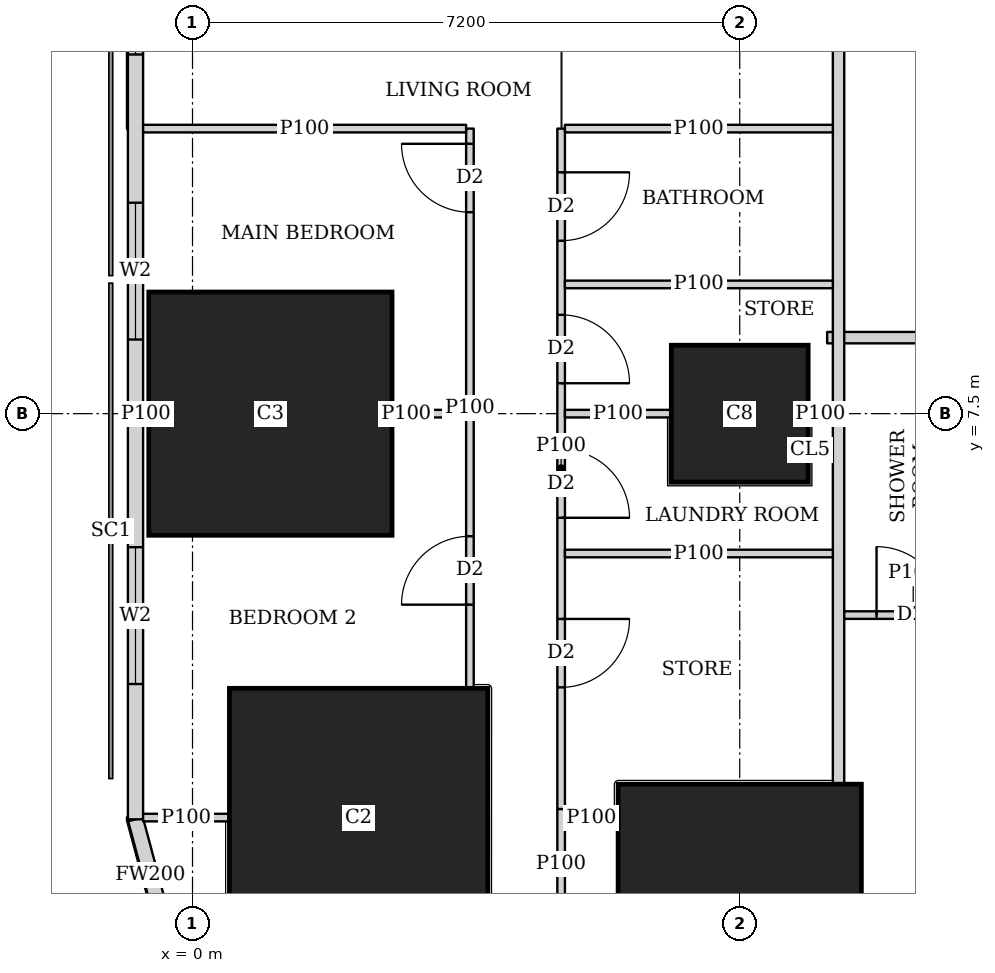
"""IFC4 building model, lengths in metres.
Left out: names, types, materials, properties, quantities, classifications, styles, units other than length and angle.
Written with IfcOpenShell. Run it as: python <this file> out.ifc"""

import sys

from ifc_helpers import new_model, si_unit, direction, frame, frame_2d, origin, origin_2d, place, context, subcontext, project, spatial, rectangle, extrude, element, fill, save


model = new_model("IFC4")
c1 = context("Model", 3, precision=1e-05, world=origin(), true_north=direction((0.0, 1.0)))
c2 = subcontext(c1, "Body", "Model", "MODEL_VIEW")
j1 = project(units=[si_unit("LENGTHUNIT", "METRE"), si_unit("PLANEANGLEUNIT", "RADIAN")], contexts=[c1])
p1 = place(None, origin())
s1 = spatial("IfcSite", under=j1, at=p1, CompositionType="ELEMENT")
p2 = place(p1, origin())
s2 = spatial("IfcBuilding", under=s1, at=p2, CompositionType="ELEMENT")
p3 = place(p2, frame((0.0, 0.0, 23.75)))
s3 = spatial("IfcBuildingStorey", under=s2, at=p3, CompositionType="ELEMENT", Elevation=23.75)
p4 = place(p3, frame((7.2, 1.025, 0.0), z_axis=(0.0, 0.0, 1.0), x_axis=(1.0, 0.0, 0.0)))
e1 = element("IfcColumn", 1, at=p4, inside=s3, PredefinedType="COLUMN", context=c2, shape_type="SweptSolid", body=[
    extrude(rectangle(XDim=3.2, YDim=3.2, at=origin_2d()), origin(), (0.0, 0.0, 1.0), 3.75),
])
p5 = place(p3, frame((2.186, 2.186, 0.0), z_axis=(0.0, 0.0, 1.0), x_axis=(1.0, 0.0, 0.0)))
e2 = element("IfcColumn", 2, at=p5, inside=s3, PredefinedType="COLUMN", context=c2, shape_type="SweptSolid", body=[
    extrude(rectangle(XDim=3.4, YDim=3.4, at=origin_2d()), origin(), (0.0, 0.0, 1.0), 3.75),
])
p6 = place(p3, frame((1.025, 7.5, 0.0), z_axis=(0.0, 0.0, 1.0), x_axis=(1.0, 0.0, 0.0)))
e3 = element("IfcColumn", 3, at=p6, inside=s3, PredefinedType="COLUMN", context=c2, shape_type="SweptSolid", body=[
    extrude(rectangle(XDim=3.2, YDim=3.2, at=origin_2d()), origin(), (0.0, 0.0, 1.0), 3.75),
])
p7 = place(p3, frame((7.2, 7.5, 0.0), z_axis=(0.0, 0.0, 1.0), x_axis=(1.0, 0.0, 0.0)))
e4 = element("IfcColumn", 4, at=p7, inside=s3, PredefinedType="COLUMN", context=c2, shape_type="SweptSolid", body=[
    extrude(rectangle(XDim=1.8, YDim=1.8, at=origin_2d()), origin(), (0.0, 0.0, 1.0), 3.75),
])
p8 = place(p3, frame((-0.75, 42.837, 0.0), z_axis=(0.0, 0.0, 1.0), x_axis=(0.0, -1.0, 0.0)))
e5 = element("IfcWall", 5, at=p8, inside=s3, PredefinedType="SOLIDWALL", context=c2, shape_type="SweptSolid", body=[
    extrude(rectangle(XDim=40.674, YDim=0.2, at=frame_2d((20.337, 0.0))), origin(), (0.0, 0.0, 1.0), 3.5),
])
p9 = place(p8, frame((1.78, 0.0, 0.9)))
e6 = element("IfcOpeningElement", 6, at=p9, cuts=e5, PredefinedType="OPENING", context=c2, shape_type="SweptSolid", body=[
    extrude(rectangle(XDim=1.8, YDim=1.5, at=frame_2d((0.9, 0.75))), frame((0.0, 0.11, 0.0), z_axis=(0.0, -1.0, 0.0), x_axis=(1.0, 0.0, 0.0)), (0.0, 0.0, 1.0), 0.22),
])
p10 = place(p8, frame((6.312, 0.0, 0.9)))
e7 = element("IfcOpeningElement", 7, at=p10, cuts=e5, PredefinedType="OPENING", context=c2, shape_type="SweptSolid", body=[
    extrude(rectangle(XDim=1.8, YDim=1.5, at=frame_2d((0.9, 0.75))), frame((0.0, 0.11, 0.0), z_axis=(0.0, -1.0, 0.0), x_axis=(1.0, 0.0, 0.0)), (0.0, 0.0, 1.0), 0.22),
])
p11 = place(p8, frame((10.062, 0.0, 0.9)))
e8 = element("IfcOpeningElement", 8, at=p11, cuts=e5, PredefinedType="OPENING", context=c2, shape_type="SweptSolid", body=[
    extrude(rectangle(XDim=1.8, YDim=1.5, at=frame_2d((0.9, 0.75))), frame((0.0, 0.11, 0.0), z_axis=(0.0, -1.0, 0.0), x_axis=(1.0, 0.0, 0.0)), (0.0, 0.0, 1.0), 0.22),
])
p12 = place(p8, frame((13.812, 0.0, 0.9)))
e9 = element("IfcOpeningElement", 9, at=p12, cuts=e5, PredefinedType="OPENING", context=c2, shape_type="SweptSolid", body=[
    extrude(rectangle(XDim=1.8, YDim=1.5, at=frame_2d((0.9, 0.75))), frame((0.0, 0.11, 0.0), z_axis=(0.0, -1.0, 0.0), x_axis=(1.0, 0.0, 0.0)), (0.0, 0.0, 1.0), 0.22),
])
p13 = place(p8, frame((17.562, 0.0, 0.9)))
e10 = element("IfcOpeningElement", 10, at=p13, cuts=e5, PredefinedType="OPENING", context=c2, shape_type="SweptSolid", body=[
    extrude(rectangle(XDim=1.8, YDim=1.5, at=frame_2d((0.9, 0.75))), frame((0.0, 0.11, 0.0), z_axis=(0.0, -1.0, 0.0), x_axis=(1.0, 0.0, 0.0)), (0.0, 0.0, 1.0), 0.22),
])
p14 = place(p8, frame((21.312, 0.0, 0.9)))
e11 = element("IfcOpeningElement", 11, at=p14, cuts=e5, PredefinedType="OPENING", context=c2, shape_type="SweptSolid", body=[
    extrude(rectangle(XDim=1.8, YDim=1.5, at=frame_2d((0.9, 0.75))), frame((0.0, 0.11, 0.0), z_axis=(0.0, -1.0, 0.0), x_axis=(1.0, 0.0, 0.0)), (0.0, 0.0, 1.0), 0.22),
])
p15 = place(p8, frame((25.062, 0.0, 0.9)))
e12 = element("IfcOpeningElement", 12, at=p15, cuts=e5, PredefinedType="OPENING", context=c2, shape_type="SweptSolid", body=[
    extrude(rectangle(XDim=1.8, YDim=1.5, at=frame_2d((0.9, 0.75))), frame((0.0, 0.11, 0.0), z_axis=(0.0, -1.0, 0.0), x_axis=(1.0, 0.0, 0.0)), (0.0, 0.0, 1.0), 0.22),
])
p16 = place(p8, frame((28.812, 0.0, 0.9)))
e13 = element("IfcOpeningElement", 13, at=p16, cuts=e5, PredefinedType="OPENING", context=c2, shape_type="SweptSolid", body=[
    extrude(rectangle(XDim=1.8, YDim=1.5, at=frame_2d((0.9, 0.75))), frame((0.0, 0.11, 0.0), z_axis=(0.0, -1.0, 0.0), x_axis=(1.0, 0.0, 0.0)), (0.0, 0.0, 1.0), 0.22),
])
p17 = place(p8, frame((32.562, 0.0, 0.9)))
e14 = element("IfcOpeningElement", 14, at=p17, cuts=e5, PredefinedType="OPENING", context=c2, shape_type="SweptSolid", body=[
    extrude(rectangle(XDim=1.8, YDim=1.5, at=frame_2d((0.9, 0.75))), frame((0.0, 0.11, 0.0), z_axis=(0.0, -1.0, 0.0), x_axis=(1.0, 0.0, 0.0)), (0.0, 0.0, 1.0), 0.22),
])
p18 = place(p8, frame((37.094, 0.0, 0.9)))
e15 = element("IfcOpeningElement", 15, at=p18, cuts=e5, PredefinedType="OPENING", context=c2, shape_type="SweptSolid", body=[
    extrude(rectangle(XDim=1.8, YDim=1.5, at=frame_2d((0.9, 0.75))), frame((0.0, 0.11, 0.0), z_axis=(0.0, -1.0, 0.0), x_axis=(1.0, 0.0, 0.0)), (0.0, 0.0, 1.0), 0.22),
])
p19 = place(p3, frame((-0.75, 2.163, 0.0), z_axis=(0.0, 0.0, 1.0), x_axis=(0.259168954497, -0.965832000415, 0.0)))
e16 = element("IfcWall", 16, at=p19, inside=s3, PredefinedType="SOLIDWALL", context=c2, shape_type="SweptSolid", body=[
    extrude(rectangle(XDim=1.513, YDim=0.2, at=frame_2d((0.756, 0.0))), origin(), (0.0, 0.0, 1.0), 3.5),
])
p20 = place(p3, frame((8.5, 2.626, 0.0), z_axis=(0.0, 0.0, 1.0), x_axis=(0.0, 1.0, 0.0)))
e17 = element("IfcWall", 17, at=p20, inside=s3, PredefinedType="SOLIDWALL", context=c2, shape_type="SweptSolid", body=[
    extrude(rectangle(XDim=39.773, YDim=0.15, at=frame_2d((19.886, 0.0))), origin(), (0.0, 0.0, 1.0), 2.05),
])
p21 = place(p20, frame((9.786, 0.0, 0.0)))
e18 = element("IfcOpeningElement", 18, at=p21, cuts=e17, PredefinedType="OPENING", context=c2, shape_type="SweptSolid", body=[
    extrude(rectangle(XDim=1.0, YDim=2.0, at=frame_2d((0.5, 1.0))), frame((0.0, 0.085, 0.0), z_axis=(0.0, -1.0, 0.0), x_axis=(1.0, 0.0, 0.0)), (0.0, 0.0, 1.0), 0.17),
])
p22 = place(p20, frame((13.961, 0.0, 0.0)))
e19 = element("IfcOpeningElement", 19, at=p22, cuts=e17, PredefinedType="OPENING", context=c2, shape_type="SweptSolid", body=[
    extrude(rectangle(XDim=1.0, YDim=2.0, at=frame_2d((0.5, 1.0))), frame((0.0, 0.085, 0.0), z_axis=(0.0, -1.0, 0.0), x_axis=(1.0, 0.0, 0.0)), (0.0, 0.0, 1.0), 0.17),
])
p23 = place(p20, frame((24.787, 0.0, 0.0)))
e20 = element("IfcOpeningElement", 20, at=p23, cuts=e17, PredefinedType="OPENING", context=c2, shape_type="SweptSolid", body=[
    extrude(rectangle(XDim=1.0, YDim=2.0, at=frame_2d((0.5, 1.0))), frame((0.0, 0.085, 0.0), z_axis=(0.0, -1.0, 0.0), x_axis=(1.0, 0.0, 0.0)), (0.0, 0.0, 1.0), 0.17),
])
p24 = place(p20, frame((32.287, 0.0, 0.0)))
e21 = element("IfcOpeningElement", 21, at=p24, cuts=e17, PredefinedType="OPENING", context=c2, shape_type="SweptSolid", body=[
    extrude(rectangle(XDim=1.0, YDim=2.0, at=frame_2d((0.5, 1.0))), frame((0.0, 0.085, 0.0), z_axis=(0.0, -1.0, 0.0), x_axis=(1.0, 0.0, 0.0)), (0.0, 0.0, 1.0), 0.17),
])
p25 = place(p3, frame((40.054, 8.5, 0.0), z_axis=(0.0, 0.0, 1.0), x_axis=(-1.0, 0.0, 0.0)))
e22 = element("IfcWall", 22, at=p25, inside=s3, PredefinedType="SOLIDWALL", context=c2, shape_type="SweptSolid", body=[
    extrude(rectangle(XDim=31.704, YDim=0.15, at=frame_2d((15.852, 0.0))), origin(), (0.0, 0.0, 1.0), 3.5),
])
p26 = place(p25, frame((27.321, 0.0, 0.0)))
e23 = element("IfcOpeningElement", 23, at=p26, cuts=e22, PredefinedType="OPENING", context=c2, shape_type="SweptSolid", body=[
    extrude(rectangle(XDim=1.0, YDim=2.1, at=frame_2d((0.5, 1.05))), frame((0.0, 0.085, 0.0), z_axis=(0.0, -1.0, 0.0), x_axis=(1.0, 0.0, 0.0)), (0.0, 0.0, 1.0), 0.17),
])
p27 = place(p25, frame((23.054, 0.0, 0.0)))
e24 = element("IfcOpeningElement", 24, at=p27, cuts=e22, PredefinedType="OPENING", context=c2, shape_type="SweptSolid", body=[
    extrude(rectangle(XDim=1.0, YDim=2.1, at=frame_2d((0.5, 1.05))), frame((0.0, 0.085, 0.0), z_axis=(0.0, -1.0, 0.0), x_axis=(1.0, 0.0, 0.0)), (0.0, 0.0, 1.0), 0.17),
])
p28 = place(p25, frame((15.754, 0.0, 0.0)))
e25 = element("IfcOpeningElement", 25, at=p28, cuts=e22, PredefinedType="OPENING", context=c2, shape_type="SweptSolid", body=[
    extrude(rectangle(XDim=1.0, YDim=2.1, at=frame_2d((0.5, 1.05))), frame((0.0, 0.085, 0.0), z_axis=(0.0, -1.0, 0.0), x_axis=(1.0, 0.0, 0.0)), (0.0, 0.0, 1.0), 0.17),
])
p29 = place(p25, frame((5.754, 0.0, 0.0)))
e26 = element("IfcOpeningElement", 26, at=p29, cuts=e22, PredefinedType="OPENING", context=c2, shape_type="SweptSolid", body=[
    extrude(rectangle(XDim=1.0, YDim=2.1, at=frame_2d((0.5, 1.05))), frame((0.0, 0.085, 0.0), z_axis=(0.0, -1.0, 0.0), x_axis=(1.0, 0.0, 0.0)), (0.0, 0.0, 1.0), 0.17),
])
p30 = place(p3, frame((3.65, 3.887, 0.0), z_axis=(0.0, 0.0, 1.0), x_axis=(0.0, 1.0, 0.0)))
e27 = element("IfcWall", 27, at=p30, inside=s3, PredefinedType="PARTITIONING", context=c2, shape_type="SweptSolid", body=[
    extrude(rectangle(XDim=7.363, YDim=0.1, at=frame_2d((3.682, 0.0))), origin(), (0.0, 0.0, 1.0), 3.5),
])
p31 = place(p30, frame((6.263, 0.0, 0.0)))
e28 = element("IfcOpeningElement", 28, at=p31, cuts=e27, PredefinedType="OPENING", context=c2, shape_type="SweptSolid", body=[
    extrude(rectangle(XDim=0.9, YDim=2.1, at=frame_2d((0.45, 1.05))), frame((0.0, 0.06, 0.0), z_axis=(0.0, -1.0, 0.0), x_axis=(1.0, 0.0, 0.0)), (0.0, 0.0, 1.0), 0.12),
])
p32 = place(p30, frame((1.1, 0.0, 0.0)))
e29 = element("IfcOpeningElement", 29, at=p32, cuts=e27, PredefinedType="OPENING", context=c2, shape_type="SweptSolid", body=[
    extrude(rectangle(XDim=0.9, YDim=2.1, at=frame_2d((0.45, 1.05))), frame((0.0, 0.06, 0.0), z_axis=(0.0, -1.0, 0.0), x_axis=(1.0, 0.0, 0.0)), (0.0, 0.0, 1.0), 0.12),
])
p33 = place(p3, frame((4.85, 0.839, 0.0), z_axis=(0.0, 0.0, 1.0), x_axis=(0.0, 1.0, 0.0)))
e30 = element("IfcWall", 30, at=p33, inside=s3, PredefinedType="PARTITIONING", context=c2, shape_type="SweptSolid", body=[
    extrude(rectangle(XDim=1.46, YDim=0.1, at=frame_2d((0.73, 0.0))), origin(), (0.0, 0.0, 1.0), 2.1),
])
p34 = place(p3, frame((4.85, 2.299, 0.0), z_axis=(0.0, 0.0, 1.0), x_axis=(0.0, 1.0, 0.0)))
e31 = element("IfcWall", 31, at=p34, inside=s3, PredefinedType="PARTITIONING", context=c2, shape_type="SweptSolid", body=[
    extrude(rectangle(XDim=8.951, YDim=0.1, at=frame_2d((4.476, 0.0))), origin(), (0.0, 0.0, 1.0), 3.5),
])
p35 = place(p34, frame((7.476, 0.0, 0.0)))
e32 = element("IfcOpeningElement", 32, at=p35, cuts=e31, PredefinedType="OPENING", context=c2, shape_type="SweptSolid", body=[
    extrude(rectangle(XDim=0.9, YDim=2.1, at=frame_2d((0.45, 1.05))), frame((0.0, 0.06, 0.0), z_axis=(0.0, -1.0, 0.0), x_axis=(1.0, 0.0, 0.0)), (0.0, 0.0, 1.0), 0.12),
])
p36 = place(p34, frame((3.831, 0.0, 0.0)))
e33 = element("IfcOpeningElement", 33, at=p36, cuts=e31, PredefinedType="OPENING", context=c2, shape_type="SweptSolid", body=[
    extrude(rectangle(XDim=0.9, YDim=2.1, at=frame_2d((0.45, 1.05))), frame((0.0, 0.06, 0.0), z_axis=(0.0, -1.0, 0.0), x_axis=(1.0, 0.0, 0.0)), (0.0, 0.0, 1.0), 0.12),
])
p37 = place(p34, frame((5.601, 0.0, 0.0)))
e34 = element("IfcOpeningElement", 34, at=p37, cuts=e31, PredefinedType="OPENING", context=c2, shape_type="SweptSolid", body=[
    extrude(rectangle(XDim=0.9, YDim=2.1, at=frame_2d((0.45, 1.05))), frame((0.0, 0.06, 0.0), z_axis=(0.0, -1.0, 0.0), x_axis=(1.0, 0.0, 0.0)), (0.0, 0.0, 1.0), 0.12),
])
p38 = place(p34, frame((1.6, 0.0, 0.0)))
e35 = element("IfcOpeningElement", 35, at=p38, cuts=e31, PredefinedType="OPENING", context=c2, shape_type="SweptSolid", body=[
    extrude(rectangle(XDim=0.9, YDim=2.1, at=frame_2d((0.45, 1.05))), frame((0.0, 0.06, 0.0), z_axis=(0.0, -1.0, 0.0), x_axis=(1.0, 0.0, 0.0)), (0.0, 0.0, 1.0), 0.12),
])
p39 = place(p3, frame((-0.65, 2.186, 0.0), z_axis=(0.0, 0.0, 1.0), x_axis=(1.0, 0.0, 0.0)))
e36 = element("IfcWall", 36, at=p39, inside=s3, PredefinedType="PARTITIONING", context=c2, shape_type="SweptSolid", body=[
    extrude(rectangle(XDim=1.135, YDim=0.1, at=frame_2d((0.567, 0.0))), origin(), (0.0, 0.0, 1.0), 3.5),
])
p40 = place(p3, frame((-0.65, 7.5, 0.0), z_axis=(0.0, 0.0, 1.0), x_axis=(1.0, 0.0, 0.0)))
e37 = element("IfcWall", 37, at=p40, inside=s3, PredefinedType="PARTITIONING", context=c2, shape_type="SweptSolid", body=[
    extrude(rectangle(XDim=0.074, YDim=0.1, at=frame_2d((0.037, 0.0))), origin(), (0.0, 0.0, 1.0), 3.5),
])
p41 = place(p3, frame((2.626, 7.5, 0.0), z_axis=(0.0, 0.0, 1.0), x_axis=(1.0, 0.0, 0.0)))
e38 = element("IfcWall", 38, at=p41, inside=s3, PredefinedType="PARTITIONING", context=c2, shape_type="SweptSolid", body=[
    extrude(rectangle(XDim=0.974, YDim=0.1, at=frame_2d((0.487, 0.0))), origin(), (0.0, 0.0, 1.0), 3.5),
])
p42 = place(p3, frame((-0.65, 11.25, 0.0), z_axis=(0.0, 0.0, 1.0), x_axis=(1.0, 0.0, 0.0)))
e39 = element("IfcWall", 39, at=p42, inside=s3, PredefinedType="PARTITIONING", context=c2, shape_type="SweptSolid", body=[
    extrude(rectangle(XDim=4.25, YDim=0.1, at=frame_2d((2.125, 0.0))), origin(), (0.0, 0.0, 1.0), 2.05),
])
p43 = place(p3, frame((4.9, 2.186, 0.0), z_axis=(0.0, 0.0, 1.0), x_axis=(1.0, 0.0, 0.0)))
e40 = element("IfcWall", 40, at=p43, inside=s3, PredefinedType="PARTITIONING", context=c2, shape_type="SweptSolid", body=[
    extrude(rectangle(XDim=0.699, YDim=0.1, at=frame_2d((0.35, 0.0))), origin(), (0.0, 0.0, 1.0), 2.1),
])
p44 = place(p3, frame((4.9, 7.5, 0.0), z_axis=(0.0, 0.0, 1.0), x_axis=(1.0, 0.0, 0.0)))
e41 = element("IfcWall", 41, at=p44, inside=s3, PredefinedType="PARTITIONING", context=c2, shape_type="SweptSolid", body=[
    extrude(rectangle(XDim=1.399, YDim=0.1, at=frame_2d((0.7, 0.0))), origin(), (0.0, 0.0, 1.0), 3.5),
])
p45 = place(p3, frame((8.101, 7.5, 0.0), z_axis=(0.0, 0.0, 1.0), x_axis=(1.0, 0.0, 0.0)))
e42 = element("IfcWall", 42, at=p45, inside=s3, PredefinedType="PARTITIONING", context=c2, shape_type="SweptSolid", body=[
    extrude(rectangle(XDim=0.324, YDim=0.1, at=frame_2d((0.162, 0.0))), origin(), (0.0, 0.0, 1.0), 3.5),
])
for number, where, z_axis, x_axis in (
    (43, (4.9, 11.25, 0.0), (0.0, 0.0, 1.0), (1.0, 0.0, 0.0)),
    (44, (4.9, 9.2, 0.0), (0.0, 0.0, 1.0), (1.0, 0.0, 0.0)),
    (45, (4.9, 5.66, 0.0), (0.0, 0.0, 1.0), (1.0, 0.0, 0.0)),
):
    element("IfcWall", number, at=place(p3, frame(where, z_axis=z_axis, x_axis=x_axis)), inside=s3, PredefinedType="PARTITIONING", context=c2, shape_type="SweptSolid", body=[
        extrude(rectangle(XDim=3.525, YDim=0.1, at=frame_2d((1.763, 0.0))), origin(), (0.0, 0.0, 1.0), 3.5),
    ])
p46 = place(p3, frame((10.39, 4.85, 0.0), z_axis=(0.0, 0.0, 1.0), x_axis=(-1.0, 0.0, 0.0)))
e46 = element("IfcWall", 46, at=p46, inside=s3, PredefinedType="PARTITIONING", context=c2, shape_type="SweptSolid", body=[
    extrude(rectangle(XDim=1.815, YDim=0.1, at=frame_2d((0.907, 0.0))), origin(), (0.0, 0.0, 1.0), 3.5),
])
p47 = place(p46, frame((0.49, 0.0, 0.0)))
e47 = element("IfcOpeningElement", 47, at=p47, cuts=e46, PredefinedType="OPENING", context=c2, shape_type="SweptSolid", body=[
    extrude(rectangle(XDim=0.9, YDim=2.1, at=frame_2d((0.45, 1.05))), frame((0.0, 0.06, 0.0), z_axis=(0.0, -1.0, 0.0), x_axis=(1.0, 0.0, 0.0)), (0.0, 0.0, 1.0), 0.12),
])
p48 = place(p16, origin())
e48 = element("IfcWindow", 48, at=p48, inside=s3, PartitioningType="SINGLE_PANEL", PredefinedType="WINDOW", context=c2, shape_type="SweptSolid", body=[
    extrude(rectangle(XDim=1.8, YDim=1.5, at=frame_2d((0.9, 0.75))), frame((0.0, 0.03, 0.0), z_axis=(0.0, -1.0, 0.0), x_axis=(1.0, 0.0, 0.0)), (0.0, 0.0, 1.0), 0.06),
])
fill(e13, e48)
p49 = place(p17, origin())
e49 = element("IfcWindow", 49, at=p49, inside=s3, PartitioningType="SINGLE_PANEL", PredefinedType="WINDOW", context=c2, shape_type="SweptSolid", body=[
    extrude(rectangle(XDim=1.8, YDim=1.5, at=frame_2d((0.9, 0.75))), frame((0.0, 0.03, 0.0), z_axis=(0.0, -1.0, 0.0), x_axis=(1.0, 0.0, 0.0)), (0.0, 0.0, 1.0), 0.06),
])
fill(e14, e49)
p50 = place(p18, origin())
e50 = element("IfcWindow", 50, at=p50, inside=s3, PartitioningType="SINGLE_PANEL", PredefinedType="WINDOW", context=c2, shape_type="SweptSolid", body=[
    extrude(rectangle(XDim=1.8, YDim=1.5, at=frame_2d((0.9, 0.75))), frame((0.0, 0.03, 0.0), z_axis=(0.0, -1.0, 0.0), x_axis=(1.0, 0.0, 0.0)), (0.0, 0.0, 1.0), 0.06),
])
fill(e15, e50)
p51 = place(p31, origin())
e51 = element("IfcDoor", 51, at=p51, inside=s3, OperationType="SINGLE_SWING_RIGHT", PredefinedType="DOOR", context=c2, shape_type="SweptSolid", body=[
    extrude(rectangle(XDim=0.9, YDim=2.1, at=frame_2d((0.45, 1.05))), frame((0.0, 0.025, 0.0), z_axis=(0.0, -1.0, 0.0), x_axis=(1.0, 0.0, 0.0)), (0.0, 0.0, 1.0), 0.05),
])
fill(e28, e51)
p52 = place(p32, origin())
e52 = element("IfcDoor", 52, at=p52, inside=s3, OperationType="SINGLE_SWING_LEFT", PredefinedType="DOOR", context=c2, shape_type="SweptSolid", body=[
    extrude(rectangle(XDim=0.9, YDim=2.1, at=frame_2d((0.45, 1.05))), frame((0.0, 0.025, 0.0), z_axis=(0.0, -1.0, 0.0), x_axis=(1.0, 0.0, 0.0)), (0.0, 0.0, 1.0), 0.05),
])
fill(e29, e52)
p53 = place(p35, origin())
e53 = element("IfcDoor", 53, at=p53, inside=s3, OperationType="SINGLE_SWING_LEFT", PredefinedType="DOOR", context=c2, shape_type="SweptSolid", body=[
    extrude(rectangle(XDim=0.9, YDim=2.1, at=frame_2d((0.45, 1.05))), frame((0.0, 0.025, 0.0), z_axis=(0.0, -1.0, 0.0), x_axis=(1.0, 0.0, 0.0)), (0.0, 0.0, 1.0), 0.05),
])
fill(e32, e53)
p54 = place(p36, origin())
e54 = element("IfcDoor", 54, at=p54, inside=s3, OperationType="SINGLE_SWING_RIGHT", PredefinedType="DOOR", context=c2, shape_type="SweptSolid", body=[
    extrude(rectangle(XDim=0.9, YDim=2.1, at=frame_2d((0.45, 1.05))), frame((0.0, 0.025, 0.0), z_axis=(0.0, -1.0, 0.0), x_axis=(1.0, 0.0, 0.0)), (0.0, 0.0, 1.0), 0.05),
])
fill(e33, e54)
p55 = place(p37, origin())
e55 = element("IfcDoor", 55, at=p55, inside=s3, OperationType="SINGLE_SWING_RIGHT", PredefinedType="DOOR", context=c2, shape_type="SweptSolid", body=[
    extrude(rectangle(XDim=0.9, YDim=2.1, at=frame_2d((0.45, 1.05))), frame((0.0, 0.025, 0.0), z_axis=(0.0, -1.0, 0.0), x_axis=(1.0, 0.0, 0.0)), (0.0, 0.0, 1.0), 0.05),
])
fill(e34, e55)
p56 = place(p38, origin())
e56 = element("IfcDoor", 56, at=p56, inside=s3, OperationType="SINGLE_SWING_LEFT", PredefinedType="DOOR", context=c2, shape_type="SweptSolid", body=[
    extrude(rectangle(XDim=0.9, YDim=2.1, at=frame_2d((0.45, 1.05))), frame((0.0, 0.025, 0.0), z_axis=(0.0, -1.0, 0.0), x_axis=(1.0, 0.0, 0.0)), (0.0, 0.0, 1.0), 0.05),
])
fill(e35, e56)
p57 = place(p47, origin())
e57 = element("IfcDoor", 57, at=p57, inside=s3, OperationType="SINGLE_SWING_LEFT", PredefinedType="DOOR", context=c2, shape_type="SweptSolid", body=[
    extrude(rectangle(XDim=0.9, YDim=2.1, at=frame_2d((0.45, 1.05))), frame((0.0, 0.025, 0.0), z_axis=(0.0, -1.0, 0.0), x_axis=(1.0, 0.0, 0.0)), (0.0, 0.0, 1.0), 0.05),
])
fill(e47, e57)
save(model, sys.argv[1])
